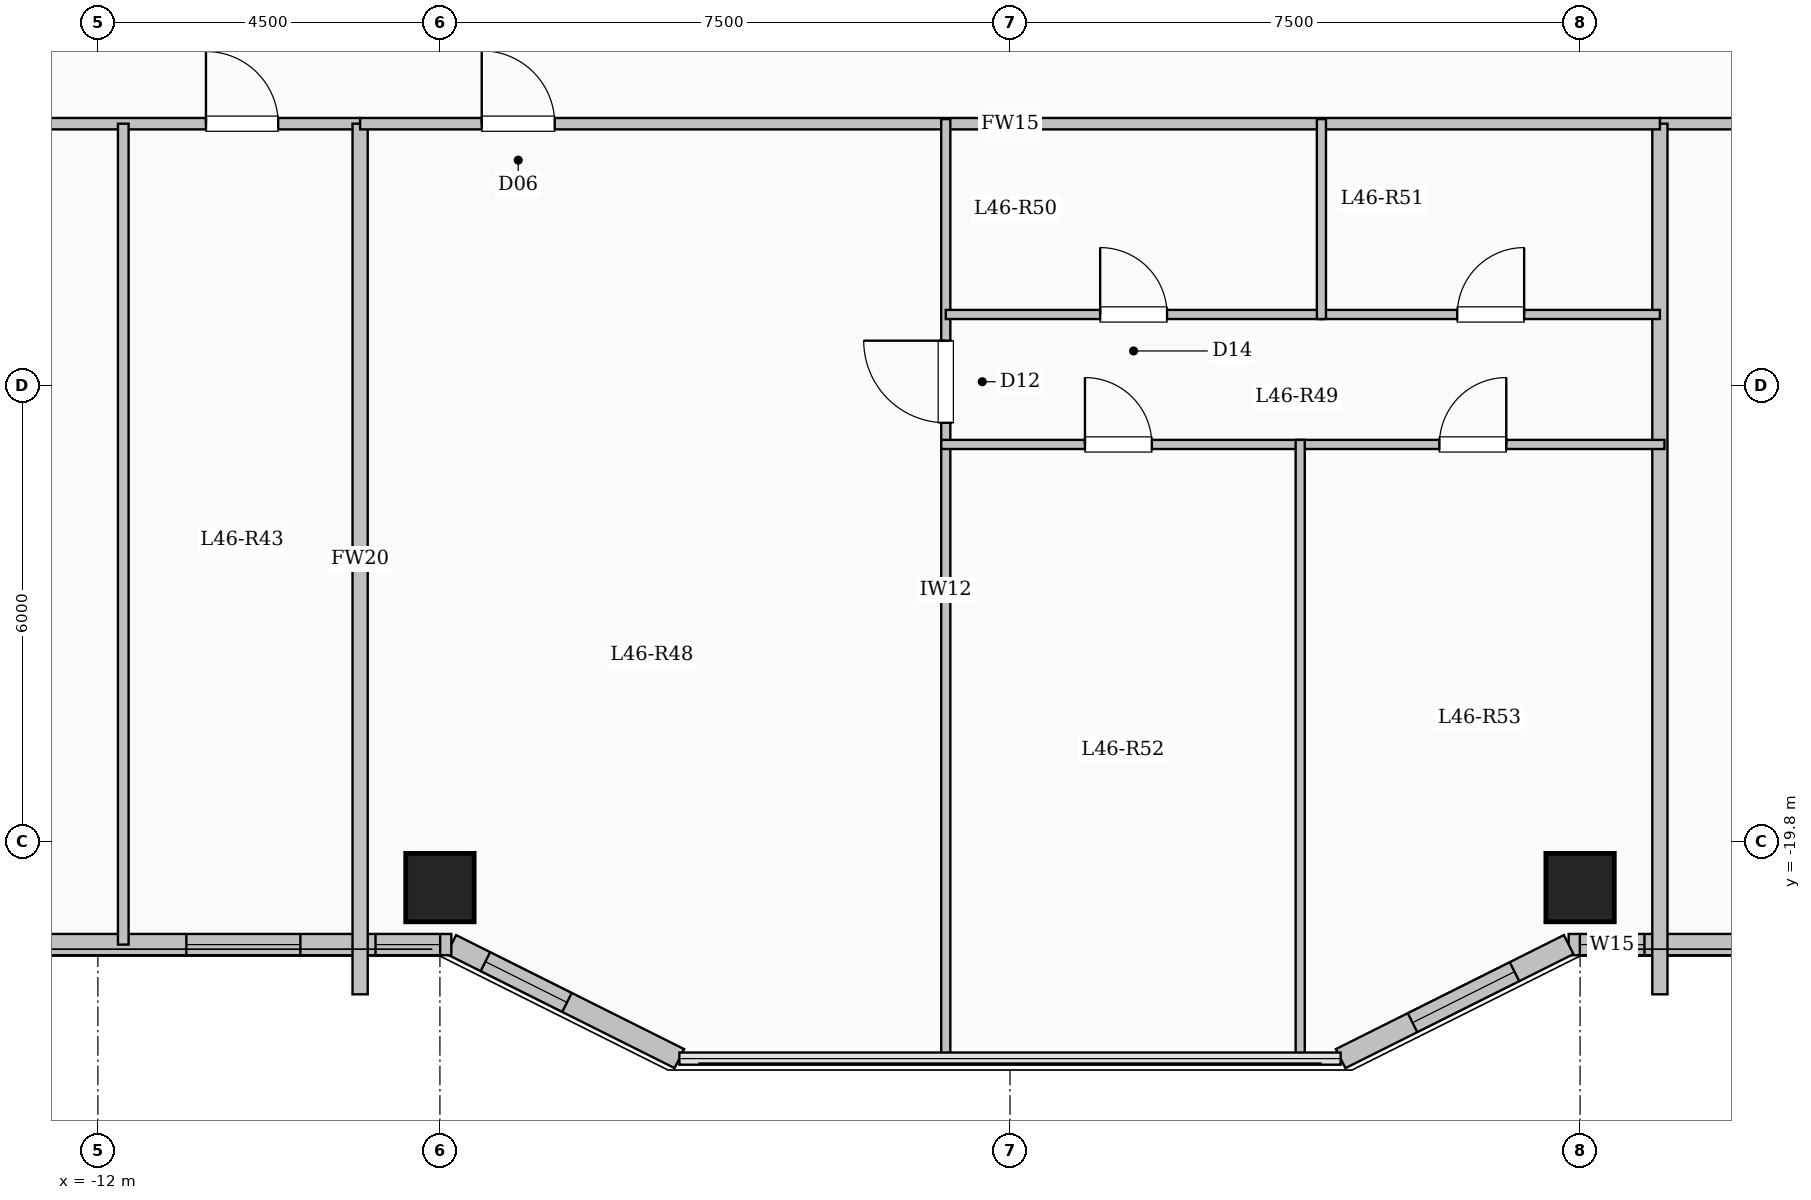
"""IFC4 building model, lengths in metres.
Left out: names, types, materials, properties, quantities, classifications, styles, units other than length and angle.
Written with IfcOpenShell. Run it as: python <this file> out.ifc"""

import sys

from ifc_helpers import new_model, si_unit, direction, frame, frame_2d, origin, origin_2d, place, context, subcontext, project, spatial, rectangle, extrude, element, fill, save


model = new_model("IFC4")
c1 = context("Model", 3, precision=1e-05, world=origin(), true_north=direction((0.0, 1.0)))
c2 = subcontext(c1, "Body", "Model", "MODEL_VIEW")
j1 = project(units=[si_unit("LENGTHUNIT", "METRE"), si_unit("PLANEANGLEUNIT", "RADIAN")], contexts=[c1])
p1 = place(None, origin())
s1 = spatial("IfcSite", under=j1, at=p1, CompositionType="ELEMENT")
p2 = place(p1, origin())
s2 = spatial("IfcBuilding", under=s1, at=p2, CompositionType="ELEMENT")
p3 = place(p2, frame((0.0, 0.0, 169.45)))
s3 = spatial("IfcBuildingStorey", under=s2, at=p3, CompositionType="ELEMENT", Elevation=169.45)
for number, where, z_axis, x_axis in (
    (1, (-7.5, -20.4, 0.0), (0.0, 0.0, 1.0), (1.0, 0.0, 0.0)),
    (2, (7.5, -20.4, 0.0), (0.0, 0.0, 1.0), (1.0, 0.0, 0.0)),
):
    element("IfcColumn", number, at=place(p3, frame(where, z_axis=z_axis, x_axis=x_axis)), inside=s3, PredefinedType="COLUMN", context=c2, shape_type="SweptSolid", body=[
        extrude(rectangle(XDim=0.9, YDim=0.9, at=origin_2d()), origin(), (0.0, 0.0, 1.0), 3.35),
    ])
p4 = place(p3, frame((19.65, -21.15, 0.0), z_axis=(0.0, 0.0, 1.0), x_axis=(-1.0, 0.0, 0.0)))
e3 = element("IfcWall", 3, at=p4, inside=s3, PredefinedType="SOLIDWALL", context=c2, shape_type="SweptSolid", body=[
    extrude(rectangle(XDim=12.3, YDim=0.28, at=frame_2d((6.15, 0.0))), origin(), (0.0, 0.0, 1.0), 3.05),
])
p5 = place(p4, frame((4.321, 0.0, 0.9)))
e4 = element("IfcOpeningElement", 4, at=p5, cuts=e3, PredefinedType="OPENING", context=c2, shape_type="SweptSolid", body=[
    extrude(rectangle(XDim=1.65, YDim=1.6, at=frame_2d((0.825, 0.8))), frame((0.0, 0.15, 0.0), z_axis=(0.0, -1.0, 0.0), x_axis=(1.0, 0.0, 0.0)), (0.0, 0.0, 1.0), 0.3),
])
p6 = place(p4, frame((8.112, 0.0, 0.9)))
e5 = element("IfcOpeningElement", 5, at=p6, cuts=e3, PredefinedType="OPENING", context=c2, shape_type="SweptSolid", body=[
    extrude(rectangle(XDim=2.0, YDim=1.7, at=frame_2d((1.0, 0.85))), frame((0.0, 0.15, 0.0), z_axis=(0.0, -1.0, 0.0), x_axis=(1.0, 0.0, 0.0)), (0.0, 0.0, 1.0), 0.3),
])
p7 = place(p4, frame((11.303, 0.0, 0.95)))
e6 = element("IfcOpeningElement", 6, at=p7, cuts=e3, PredefinedType="OPENING", context=c2, shape_type="SweptSolid", body=[
    extrude(rectangle(XDim=0.85, YDim=1.5, at=frame_2d((0.425, 0.75))), frame((0.0, 0.15, 0.0), z_axis=(0.0, -1.0, 0.0), x_axis=(1.0, 0.0, 0.0)), (0.0, 0.0, 1.0), 0.3),
])
p8 = place(p3, frame((7.35, -21.15, 0.0), z_axis=(0.0, 0.0, 1.0), x_axis=(-0.894427191, -0.4472135955, 0.0)))
e7 = element("IfcWall", 7, at=p8, inside=s3, PredefinedType="SOLIDWALL", context=c2, shape_type="SweptSolid", body=[
    extrude(rectangle(XDim=3.354, YDim=0.28, at=frame_2d((1.677, 0.0))), origin(), (0.0, 0.0, 1.0), 3.05),
])
p9 = place(p8, frame((0.797, 0.0, 0.9)))
e8 = element("IfcOpeningElement", 8, at=p9, cuts=e7, PredefinedType="OPENING", context=c2, shape_type="SweptSolid", body=[
    extrude(rectangle(XDim=1.5, YDim=1.65, at=frame_2d((0.75, 0.825))), frame((0.0, 0.15, 0.0), z_axis=(0.0, -1.0, 0.0), x_axis=(1.0, 0.0, 0.0)), (0.0, 0.0, 1.0), 0.3),
])
p10 = place(p3, frame((-4.35, -22.65, 0.0), z_axis=(0.0, 0.0, 1.0), x_axis=(-0.894427191, 0.4472135955, 0.0)))
e9 = element("IfcWall", 9, at=p10, inside=s3, PredefinedType="SOLIDWALL", context=c2, shape_type="SweptSolid", body=[
    extrude(rectangle(XDim=3.354, YDim=0.28, at=frame_2d((1.677, 0.0))), origin(), (0.0, 0.0, 1.0), 3.05),
])
p11 = place(p10, frame((1.653, 0.0, 0.95)))
e10 = element("IfcOpeningElement", 10, at=p11, cuts=e9, PredefinedType="OPENING", context=c2, shape_type="SweptSolid", body=[
    extrude(rectangle(XDim=1.2, YDim=1.5, at=frame_2d((0.6, 0.75))), frame((0.0, 0.15, 0.0), z_axis=(0.0, -1.0, 0.0), x_axis=(1.0, 0.0, 0.0)), (0.0, 0.0, 1.0), 0.3),
])
p12 = place(p3, frame((-7.35, -21.15, 0.0), z_axis=(0.0, 0.0, 1.0), x_axis=(-1.0, 0.0, 0.0)))
e11 = element("IfcWall", 11, at=p12, inside=s3, PredefinedType="SOLIDWALL", context=c2, shape_type="SweptSolid", body=[
    extrude(rectangle(XDim=12.3, YDim=0.28, at=frame_2d((6.15, 0.0))), origin(), (0.0, 0.0, 1.0), 3.05),
])
p13 = place(p12, frame((0.147, 0.0, 0.95)))
e12 = element("IfcOpeningElement", 12, at=p13, cuts=e11, PredefinedType="OPENING", context=c2, shape_type="SweptSolid", body=[
    extrude(rectangle(XDim=0.85, YDim=1.5, at=frame_2d((0.425, 0.75))), frame((0.0, 0.15, 0.0), z_axis=(0.0, -1.0, 0.0), x_axis=(1.0, 0.0, 0.0)), (0.0, 0.0, 1.0), 0.3),
])
p14 = place(p12, frame((1.986, 0.0, 0.9)))
e13 = element("IfcOpeningElement", 13, at=p14, cuts=e11, PredefinedType="OPENING", context=c2, shape_type="SweptSolid", body=[
    extrude(rectangle(XDim=1.5, YDim=1.65, at=frame_2d((0.75, 0.825))), frame((0.0, 0.15, 0.0), z_axis=(0.0, -1.0, 0.0), x_axis=(1.0, 0.0, 0.0)), (0.0, 0.0, 1.0), 0.3),
])
p15 = place(p12, frame((5.275, 0.0, 0.9)))
e14 = element("IfcOpeningElement", 14, at=p15, cuts=e11, PredefinedType="OPENING", context=c2, shape_type="SweptSolid", body=[
    extrude(rectangle(XDim=2.0, YDim=1.7, at=frame_2d((1.0, 0.85))), frame((0.0, 0.15, 0.0), z_axis=(0.0, -1.0, 0.0), x_axis=(1.0, 0.0, 0.0)), (0.0, 0.0, 1.0), 0.3),
])
p16 = place(p12, frame((9.267, 0.0, 0.9)))
e15 = element("IfcOpeningElement", 15, at=p16, cuts=e11, PredefinedType="OPENING", context=c2, shape_type="SweptSolid", body=[
    extrude(rectangle(XDim=2.0, YDim=1.7, at=frame_2d((1.0, 0.85))), frame((0.0, 0.15, 0.0), z_axis=(0.0, -1.0, 0.0), x_axis=(1.0, 0.0, 0.0)), (0.0, 0.0, 1.0), 0.3),
])
p17 = place(p3, frame((-19.55, -10.35, 0.0), z_axis=(0.0, 0.0, 1.0), x_axis=(1.0, 0.0, 0.0)))
e16 = element("IfcWall", 16, at=p17, inside=s3, PredefinedType="PARTITIONING", context=c2, shape_type="SweptSolid", body=[
    extrude(rectangle(XDim=11.0, YDim=0.15, at=frame_2d((5.5, 0.0))), origin(), (0.0, 0.0, 1.0), 3.05),
])
p18 = place(p17, frame((1.466, 0.0, 0.0)))
e17 = element("IfcOpeningElement", 17, at=p18, cuts=e16, PredefinedType="OPENING", context=c2, shape_type="SweptSolid", body=[
    extrude(rectangle(XDim=0.95, YDim=2.15, at=frame_2d((0.475, 1.075))), frame((0.0, 0.085, 0.0), z_axis=(0.0, -1.0, 0.0), x_axis=(1.0, 0.0, 0.0)), (0.0, 0.0, 1.0), 0.17),
])
p19 = place(p17, frame((5.438, 0.0, 0.0)))
e18 = element("IfcOpeningElement", 18, at=p19, cuts=e16, PredefinedType="OPENING", context=c2, shape_type="SweptSolid", body=[
    extrude(rectangle(XDim=0.95, YDim=2.15, at=frame_2d((0.475, 1.075))), frame((0.0, 0.085, 0.0), z_axis=(0.0, -1.0, 0.0), x_axis=(1.0, 0.0, 0.0)), (0.0, 0.0, 1.0), 0.17),
])
p20 = place(p17, frame((8.972, 0.0, 0.0)))
e19 = element("IfcOpeningElement", 19, at=p20, cuts=e16, PredefinedType="OPENING", context=c2, shape_type="SweptSolid", body=[
    extrude(rectangle(XDim=0.95, YDim=2.15, at=frame_2d((0.475, 1.075))), frame((0.0, 0.085, 0.0), z_axis=(0.0, -1.0, 0.0), x_axis=(1.0, 0.0, 0.0)), (0.0, 0.0, 1.0), 0.17),
])
p21 = place(p3, frame((8.55, -10.35, 0.0), z_axis=(0.0, 0.0, 1.0), x_axis=(1.0, 0.0, 0.0)))
e20 = element("IfcWall", 20, at=p21, inside=s3, PredefinedType="PARTITIONING", context=c2, shape_type="SweptSolid", body=[
    extrude(rectangle(XDim=11.0, YDim=0.15, at=frame_2d((5.5, 0.0))), origin(), (0.0, 0.0, 1.0), 3.05),
])
p22 = place(p21, frame((1.516, 0.0, 0.0)))
e21 = element("IfcOpeningElement", 21, at=p22, cuts=e20, PredefinedType="OPENING", context=c2, shape_type="SweptSolid", body=[
    extrude(rectangle(XDim=0.95, YDim=2.15, at=frame_2d((0.475, 1.075))), frame((0.0, 0.085, 0.0), z_axis=(0.0, -1.0, 0.0), x_axis=(1.0, 0.0, 0.0)), (0.0, 0.0, 1.0), 0.17),
])
p23 = place(p21, frame((5.488, 0.0, 0.0)))
e22 = element("IfcOpeningElement", 22, at=p23, cuts=e20, PredefinedType="OPENING", context=c2, shape_type="SweptSolid", body=[
    extrude(rectangle(XDim=0.95, YDim=2.15, at=frame_2d((0.475, 1.075))), frame((0.0, 0.085, 0.0), z_axis=(0.0, -1.0, 0.0), x_axis=(1.0, 0.0, 0.0)), (0.0, 0.0, 1.0), 0.17),
])
p24 = place(p21, frame((9.022, 0.0, 0.0)))
e23 = element("IfcOpeningElement", 23, at=p24, cuts=e20, PredefinedType="OPENING", context=c2, shape_type="SweptSolid", body=[
    extrude(rectangle(XDim=0.95, YDim=2.15, at=frame_2d((0.475, 1.075))), frame((0.0, 0.085, 0.0), z_axis=(0.0, -1.0, 0.0), x_axis=(1.0, 0.0, 0.0)), (0.0, 0.0, 1.0), 0.17),
])
p25 = place(p3, frame((-11.666, -21.15, 0.0), z_axis=(0.0, 0.0, 1.0), x_axis=(0.0, 1.0, 0.0)))
e24 = element("IfcWall", 24, at=p25, inside=s3, PredefinedType="PARTITIONING", context=c2, shape_type="SweptSolid", body=[
    extrude(rectangle(XDim=10.8, YDim=0.14, at=frame_2d((5.4, 0.0))), origin(), (0.0, 0.0, 1.0), 3.05),
])
for number, where, z_axis, x_axis in (
    (25, (-8.55, -21.804, 0.0), (0.0, 0.0, 1.0), (0.0, 1.0, 0.0)),
    (26, (8.55, -21.804, 0.0), (0.0, 0.0, 1.0), (0.0, 1.0, 0.0)),
):
    element("IfcWall", number, at=place(p3, frame(where, z_axis=z_axis, x_axis=x_axis)), inside=s3, PredefinedType="SOLIDWALL", context=c2, shape_type="SweptSolid", body=[
        extrude(rectangle(XDim=11.454, YDim=0.2, at=frame_2d((5.727, 0.0))), origin(), (0.0, 0.0, 1.0), 3.05),
    ])
p26 = place(p3, frame((-8.55, -10.35, 0.0), z_axis=(0.0, 0.0, 1.0), x_axis=(1.0, 0.0, 0.0)))
e27 = element("IfcWall", 27, at=p26, inside=s3, PredefinedType="PARTITIONING", context=c2, shape_type="SweptSolid", body=[
    extrude(rectangle(XDim=17.1, YDim=0.15, at=frame_2d((8.55, 0.0))), origin(), (0.0, 0.0, 1.0), 3.05),
])
p27 = place(p26, frame((1.6, 0.0, 0.0)))
e28 = element("IfcOpeningElement", 28, at=p27, cuts=e27, PredefinedType="OPENING", context=c2, shape_type="SweptSolid", body=[
    extrude(rectangle(XDim=0.96, YDim=2.15, at=frame_2d((0.48, 1.075))), frame((0.0, 0.085, 0.0), z_axis=(0.0, -1.0, 0.0), x_axis=(1.0, 0.0, 0.0)), (0.0, 0.0, 1.0), 0.17),
])
p28 = place(p3, frame((-0.845, -22.68, 0.0), z_axis=(0.0, 0.0, 1.0), x_axis=(0.0, 1.0, 0.0)))
e29 = element("IfcWall", 29, at=p28, inside=s3, PredefinedType="PARTITIONING", context=c2, shape_type="SweptSolid", body=[
    extrude(rectangle(XDim=12.39, YDim=0.12, at=frame_2d((6.195, 0.0))), origin(), (0.0, 0.0, 1.0), 3.05),
])
p29 = place(p28, frame((8.395, 0.0, 0.0)))
e30 = element("IfcOpeningElement", 30, at=p29, cuts=e29, PredefinedType="OPENING", context=c2, shape_type="SweptSolid", body=[
    extrude(rectangle(XDim=1.08, YDim=2.15, at=frame_2d((0.54, 1.075))), frame((0.0, 0.07, 0.0), z_axis=(0.0, -1.0, 0.0), x_axis=(1.0, 0.0, 0.0)), (0.0, 0.0, 1.0), 0.14),
])
p30 = place(p3, frame((-0.845, -12.86, 0.0), z_axis=(0.0, 0.0, 1.0), x_axis=(1.0, 0.0, 0.0)))
e31 = element("IfcWall", 31, at=p30, inside=s3, PredefinedType="PARTITIONING", context=c2, shape_type="SweptSolid", body=[
    extrude(rectangle(XDim=4.942, YDim=0.12, at=frame_2d((2.471, 0.0))), origin(), (0.0, 0.0, 1.0), 3.05),
])
p31 = place(p30, frame((2.031, 0.0, 0.0)))
e32 = element("IfcOpeningElement", 32, at=p31, cuts=e31, PredefinedType="OPENING", context=c2, shape_type="SweptSolid", body=[
    extrude(rectangle(XDim=0.88, YDim=2.1, at=frame_2d((0.44, 1.05))), frame((0.0, 0.07, 0.0), z_axis=(0.0, -1.0, 0.0), x_axis=(1.0, 0.0, 0.0)), (0.0, 0.0, 1.0), 0.14),
])
p32 = place(p3, frame((4.097, -12.86, 0.0), z_axis=(0.0, 0.0, 1.0), x_axis=(1.0, 0.0, 0.0)))
e33 = element("IfcWall", 33, at=p32, inside=s3, PredefinedType="PARTITIONING", context=c2, shape_type="SweptSolid", body=[
    extrude(rectangle(XDim=4.453, YDim=0.12, at=frame_2d((2.227, 0.0))), origin(), (0.0, 0.0, 1.0), 3.05),
])
p33 = place(p32, frame((1.787, 0.0, 0.0)))
e34 = element("IfcOpeningElement", 34, at=p33, cuts=e33, PredefinedType="OPENING", context=c2, shape_type="SweptSolid", body=[
    extrude(rectangle(XDim=0.88, YDim=2.1, at=frame_2d((0.44, 1.05))), frame((0.0, 0.07, 0.0), z_axis=(0.0, -1.0, 0.0), x_axis=(1.0, 0.0, 0.0)), (0.0, 0.0, 1.0), 0.14),
])
p34 = place(p3, frame((-0.905, -14.57, 0.0), z_axis=(0.0, 0.0, 1.0), x_axis=(1.0, 0.0, 0.0)))
e35 = element("IfcWall", 35, at=p34, inside=s3, PredefinedType="PARTITIONING", context=c2, shape_type="SweptSolid", body=[
    extrude(rectangle(XDim=9.515, YDim=0.12, at=frame_2d((4.758, 0.0))), origin(), (0.0, 0.0, 1.0), 3.05),
])
p35 = place(p34, frame((1.891, 0.0, 0.0)))
e36 = element("IfcOpeningElement", 36, at=p35, cuts=e35, PredefinedType="OPENING", context=c2, shape_type="SweptSolid", body=[
    extrude(rectangle(XDim=0.88, YDim=2.1, at=frame_2d((0.44, 1.05))), frame((0.0, 0.07, 0.0), z_axis=(0.0, -1.0, 0.0), x_axis=(1.0, 0.0, 0.0)), (0.0, 0.0, 1.0), 0.14),
])
p36 = place(p34, frame((6.554, 0.0, 0.0)))
e37 = element("IfcOpeningElement", 37, at=p36, cuts=e35, PredefinedType="OPENING", context=c2, shape_type="SweptSolid", body=[
    extrude(rectangle(XDim=0.88, YDim=2.1, at=frame_2d((0.44, 1.05))), frame((0.0, 0.07, 0.0), z_axis=(0.0, -1.0, 0.0), x_axis=(1.0, 0.0, 0.0)), (0.0, 0.0, 1.0), 0.14),
])
p37 = place(p3, frame((4.097, -12.92, 0.0), z_axis=(0.0, 0.0, 1.0), x_axis=(0.0, 1.0, 0.0)))
e38 = element("IfcWall", 38, at=p37, inside=s3, PredefinedType="PARTITIONING", context=c2, shape_type="SweptSolid", body=[
    extrude(rectangle(XDim=2.63, YDim=0.12, at=frame_2d((1.315, 0.0))), origin(), (0.0, 0.0, 1.0), 3.05),
])
p38 = place(p3, frame((3.818, -22.68, 0.0), z_axis=(0.0, 0.0, 1.0), x_axis=(0.0, 1.0, 0.0)))
e39 = element("IfcWall", 39, at=p38, inside=s3, PredefinedType="PARTITIONING", context=c2, shape_type="SweptSolid", body=[
    extrude(rectangle(XDim=8.17, YDim=0.12, at=frame_2d((4.085, 0.0))), origin(), (0.0, 0.0, 1.0), 3.05),
])
p39 = place(p7, origin())
e40 = element("IfcWindow", 40, at=p39, inside=s3, PartitioningType="SINGLE_PANEL", PredefinedType="WINDOW", context=c2, shape_type="SweptSolid", body=[
    extrude(rectangle(XDim=0.85, YDim=1.5, at=frame_2d((0.425, 0.75))), frame((0.0, 0.03, 0.0), z_axis=(0.0, -1.0, 0.0), x_axis=(1.0, 0.0, 0.0)), (0.0, 0.0, 1.0), 0.06),
])
fill(e6, e40)
p40 = place(p9, origin())
e41 = element("IfcWindow", 41, at=p40, inside=s3, PartitioningType="SINGLE_PANEL", PredefinedType="WINDOW", context=c2, shape_type="SweptSolid", body=[
    extrude(rectangle(XDim=1.5, YDim=1.65, at=frame_2d((0.75, 0.825))), frame((0.0, 0.03, 0.0), z_axis=(0.0, -1.0, 0.0), x_axis=(1.0, 0.0, 0.0)), (0.0, 0.0, 1.0), 0.06),
])
fill(e8, e41)
p41 = place(p11, origin())
e42 = element("IfcWindow", 42, at=p41, inside=s3, PartitioningType="SINGLE_PANEL", PredefinedType="WINDOW", context=c2, shape_type="SweptSolid", body=[
    extrude(rectangle(XDim=1.2, YDim=1.5, at=frame_2d((0.6, 0.75))), frame((0.0, 0.03, 0.0), z_axis=(0.0, -1.0, 0.0), x_axis=(1.0, 0.0, 0.0)), (0.0, 0.0, 1.0), 0.06),
])
fill(e10, e42)
p42 = place(p13, origin())
e43 = element("IfcWindow", 43, at=p42, inside=s3, PartitioningType="SINGLE_PANEL", PredefinedType="WINDOW", context=c2, shape_type="SweptSolid", body=[
    extrude(rectangle(XDim=0.85, YDim=1.5, at=frame_2d((0.425, 0.75))), frame((0.0, 0.03, 0.0), z_axis=(0.0, -1.0, 0.0), x_axis=(1.0, 0.0, 0.0)), (0.0, 0.0, 1.0), 0.06),
])
fill(e12, e43)
p43 = place(p14, origin())
e44 = element("IfcWindow", 44, at=p43, inside=s3, PartitioningType="SINGLE_PANEL", PredefinedType="WINDOW", context=c2, shape_type="SweptSolid", body=[
    extrude(rectangle(XDim=1.5, YDim=1.65, at=frame_2d((0.75, 0.825))), frame((0.0, 0.03, 0.0), z_axis=(0.0, -1.0, 0.0), x_axis=(1.0, 0.0, 0.0)), (0.0, 0.0, 1.0), 0.06),
])
fill(e13, e44)
p44 = place(p20, origin())
e45 = element("IfcDoor", 45, at=p44, inside=s3, OperationType="SINGLE_SWING_LEFT", PredefinedType="DOOR", context=c2, shape_type="SweptSolid", body=[
    extrude(rectangle(XDim=0.95, YDim=2.15, at=frame_2d((0.475, 1.075))), frame((0.0, 0.025, 0.0), z_axis=(0.0, -1.0, 0.0), x_axis=(1.0, 0.0, 0.0)), (0.0, 0.0, 1.0), 0.05),
])
fill(e19, e45)
p45 = place(p27, origin())
e46 = element("IfcDoor", 46, at=p45, inside=s3, OperationType="SINGLE_SWING_LEFT", PredefinedType="DOOR", context=c2, shape_type="SweptSolid", body=[
    extrude(rectangle(XDim=0.96, YDim=2.15, at=frame_2d((0.48, 1.075))), frame((0.0, 0.025, 0.0), z_axis=(0.0, -1.0, 0.0), x_axis=(1.0, 0.0, 0.0)), (0.0, 0.0, 1.0), 0.05),
])
fill(e28, e46)
p46 = place(p29, origin())
e47 = element("IfcDoor", 47, at=p46, inside=s3, OperationType="SINGLE_SWING_RIGHT", PredefinedType="DOOR", context=c2, shape_type="SweptSolid", body=[
    extrude(rectangle(XDim=1.08, YDim=2.15, at=frame_2d((0.54, 1.075))), frame((0.0, 0.025, 0.0), z_axis=(0.0, -1.0, 0.0), x_axis=(1.0, 0.0, 0.0)), (0.0, 0.0, 1.0), 0.05),
])
fill(e30, e47)
p47 = place(p31, origin())
e48 = element("IfcDoor", 48, at=p47, inside=s3, OperationType="SINGLE_SWING_LEFT", PredefinedType="DOOR", context=c2, shape_type="SweptSolid", body=[
    extrude(rectangle(XDim=0.88, YDim=2.1, at=frame_2d((0.44, 1.05))), frame((0.0, 0.025, 0.0), z_axis=(0.0, -1.0, 0.0), x_axis=(1.0, 0.0, 0.0)), (0.0, 0.0, 1.0), 0.05),
])
fill(e32, e48)
p48 = place(p33, origin())
e49 = element("IfcDoor", 49, at=p48, inside=s3, OperationType="SINGLE_SWING_RIGHT", PredefinedType="DOOR", context=c2, shape_type="SweptSolid", body=[
    extrude(rectangle(XDim=0.88, YDim=2.1, at=frame_2d((0.44, 1.05))), frame((0.0, 0.025, 0.0), z_axis=(0.0, -1.0, 0.0), x_axis=(1.0, 0.0, 0.0)), (0.0, 0.0, 1.0), 0.05),
])
fill(e34, e49)
p49 = place(p35, origin())
e50 = element("IfcDoor", 50, at=p49, inside=s3, OperationType="SINGLE_SWING_LEFT", PredefinedType="DOOR", context=c2, shape_type="SweptSolid", body=[
    extrude(rectangle(XDim=0.88, YDim=2.1, at=frame_2d((0.44, 1.05))), frame((0.0, 0.025, 0.0), z_axis=(0.0, -1.0, 0.0), x_axis=(1.0, 0.0, 0.0)), (0.0, 0.0, 1.0), 0.05),
])
fill(e36, e50)
p50 = place(p36, origin())
e51 = element("IfcDoor", 51, at=p50, inside=s3, OperationType="SINGLE_SWING_RIGHT", PredefinedType="DOOR", context=c2, shape_type="SweptSolid", body=[
    extrude(rectangle(XDim=0.88, YDim=2.1, at=frame_2d((0.44, 1.05))), frame((0.0, 0.025, 0.0), z_axis=(0.0, -1.0, 0.0), x_axis=(1.0, 0.0, 0.0)), (0.0, 0.0, 1.0), 0.05),
])
fill(e37, e51)
save(model, sys.argv[1])
